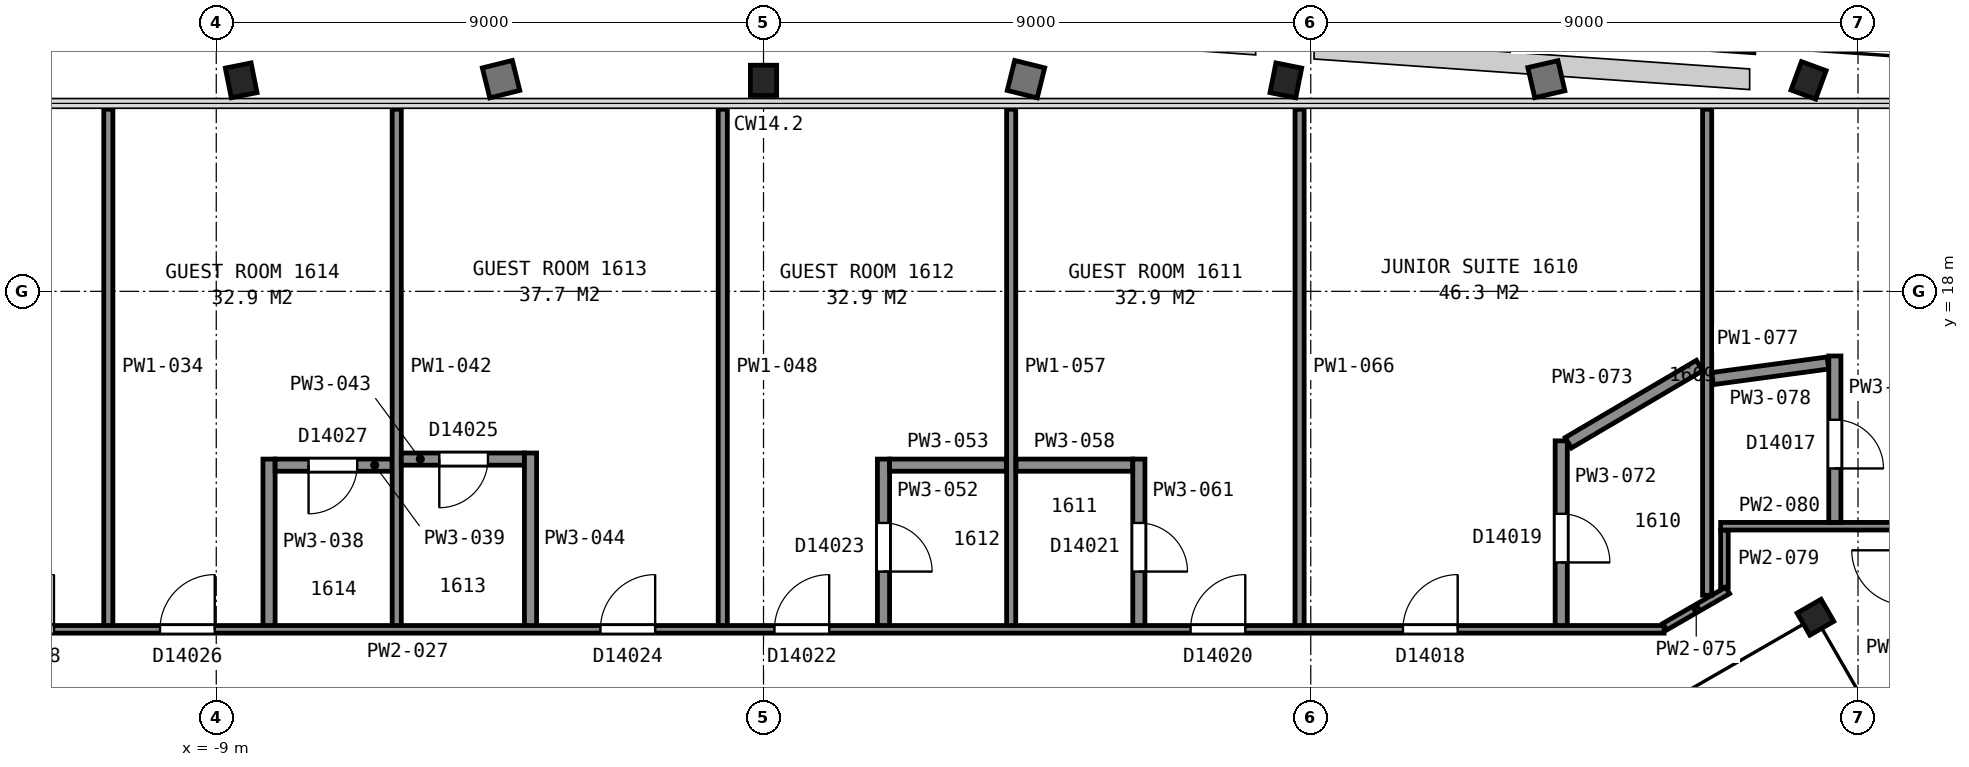
"""IFC4 building model, lengths in metres.
Left out: names, types, materials, properties, quantities, classifications, styles, units other than length and angle.
Written with IfcOpenShell. Run it as: python <this file> out.ifc"""

import sys

from ifc_helpers import new_model, si_unit, direction, frame, frame_2d, origin, origin_2d, place, context, subcontext, project, spatial, rectangle, i_section, extrude, element, fill, save


model = new_model("IFC4")
c1 = context("Model", 3, precision=1e-05, world=origin(), true_north=direction((0.0, 1.0)))
c2 = subcontext(c1, "Body", "Model", "MODEL_VIEW")
j1 = project(units=[si_unit("LENGTHUNIT", "METRE"), si_unit("PLANEANGLEUNIT", "RADIAN")], contexts=[c1])
p1 = place(None, origin())
s1 = spatial("IfcSite", under=j1, at=p1, CompositionType="ELEMENT")
p2 = place(p1, origin())
s2 = spatial("IfcBuilding", under=s1, at=p2, CompositionType="ELEMENT")
p3 = place(p2, frame((0.0, 0.0, 72.8)))
s3 = spatial("IfcBuildingStorey", under=s2, at=p3, CompositionType="ELEMENT", Elevation=72.8)
p4 = place(p3, frame((17.151, 21.372, 0.025), z_axis=(0.030414757347, 0.083024067354, 0.996083303131), x_axis=(0.999533369763, 0.000291044086, -0.030544361571)))
e1 = element("IfcColumn", 1, at=p4, inside=s3, PredefinedType="COLUMN", context=c2, shape_type="SweptSolid", body=[
    extrude(i_section(OverallWidth=0.432, OverallDepth=0.498, WebThickness=0.056, FlangeThickness=0.089, FilletRadius=0.015, at=origin_2d()), origin(), (0.0, 0.0, 1.0), 3.564),
])
p5 = place(p3, frame((8.57, 21.372, 0.025), z_axis=(0.016651310151, 0.083050979027, 0.996406176593), x_axis=(0.999860944096, -0.000477080894, -0.016669279099)))
e2 = element("IfcColumn", 2, at=p5, inside=s3, PredefinedType="COLUMN", context=c2, shape_type="SweptSolid", body=[
    extrude(i_section(OverallWidth=0.432, OverallDepth=0.498, WebThickness=0.056, FlangeThickness=0.089, FilletRadius=0.015, at=origin_2d()), origin(), (0.0, 0.0, 1.0), 3.563),
])
p6 = place(p3, frame((0.0, 21.372, 0.025), z_axis=(0.0, 0.083062495034, 0.996544340167), x_axis=(1.0, 0.0, 0.0)))
e3 = element("IfcColumn", 3, at=p6, inside=s3, PredefinedType="COLUMN", context=c2, shape_type="SweptSolid", body=[
    extrude(i_section(OverallWidth=0.432, OverallDepth=0.498, WebThickness=0.056, FlangeThickness=0.089, FilletRadius=0.015, at=origin_2d()), origin(), (0.0, 0.0, 1.0), 3.562),
])
p7 = place(p3, frame((-8.57, 21.372, 0.025), z_axis=(-0.016651310151, 0.083050979027, 0.996406176593), x_axis=(0.999860944096, 0.000477080894, 0.016669279099)))
e4 = element("IfcColumn", 4, at=p7, inside=s3, PredefinedType="COLUMN", context=c2, shape_type="SweptSolid", body=[
    extrude(i_section(OverallWidth=0.432, OverallDepth=0.498, WebThickness=0.056, FlangeThickness=0.089, FilletRadius=0.015, at=origin_2d()), origin(), (0.0, 0.0, 1.0), 3.563),
])
p8 = place(p3, frame((17.3, 12.64, 0.0), z_axis=(0.0, 0.0, 1.0), x_axis=(0.5, -0.866025403784, 0.0)))
e5 = element("IfcColumn", 5, at=p8, inside=s3, PredefinedType="COLUMN", context=c2, shape_type="SweptSolid", body=[
    extrude(i_section(OverallWidth=0.419, OverallDepth=0.455, WebThickness=0.042, FlangeThickness=0.068, FilletRadius=0.015, at=origin_2d()), origin(), (0.0, 0.0, 1.0), 3.6),
])
p9 = place(p3, frame((-14.811, 12.441, 0.0), z_axis=(0.0, 0.0, 1.0), x_axis=(1.0, 0.0, 0.0)))
e6 = element("IfcWall", 6, at=p9, inside=s3, PredefinedType="PARTITIONING", context=c2, shape_type="SweptSolid", body=[
    extrude(rectangle(XDim=29.621, YDim=0.125, at=frame_2d((14.811, 0.0))), origin(), (0.0, 0.0, 1.0), 2.613),
])
p10 = place(p9, frame((25.326, 0.0, 0.0)))
e7 = element("IfcOpeningElement", 7, at=p10, cuts=e6, PredefinedType="OPENING", context=c2, shape_type="SweptSolid", body=[
    extrude(rectangle(XDim=0.9, YDim=2.1, at=frame_2d((0.45, 1.05))), frame((0.0, 0.073, 0.0), z_axis=(0.0, -1.0, 0.0), x_axis=(1.0, 0.0, 0.0)), (0.0, 0.0, 1.0), 0.145),
])
p11 = place(p9, frame((21.833, 0.0, 0.0)))
e8 = element("IfcOpeningElement", 8, at=p11, cuts=e6, PredefinedType="OPENING", context=c2, shape_type="SweptSolid", body=[
    extrude(rectangle(XDim=0.9, YDim=2.1, at=frame_2d((0.45, 1.05))), frame((0.0, 0.073, 0.0), z_axis=(0.0, -1.0, 0.0), x_axis=(1.0, 0.0, 0.0)), (0.0, 0.0, 1.0), 0.145),
])
p12 = place(p9, frame((14.99, 0.0, 0.0)))
e9 = element("IfcOpeningElement", 9, at=p12, cuts=e6, PredefinedType="OPENING", context=c2, shape_type="SweptSolid", body=[
    extrude(rectangle(XDim=0.9, YDim=2.1, at=frame_2d((0.45, 1.05))), frame((0.0, 0.073, 0.0), z_axis=(0.0, -1.0, 0.0), x_axis=(1.0, 0.0, 0.0)), (0.0, 0.0, 1.0), 0.145),
])
p13 = place(p9, frame((12.128, 0.0, 0.0)))
e10 = element("IfcOpeningElement", 10, at=p13, cuts=e6, PredefinedType="OPENING", context=c2, shape_type="SweptSolid", body=[
    extrude(rectangle(XDim=0.9, YDim=2.1, at=frame_2d((0.45, 1.05))), frame((0.0, 0.073, 0.0), z_axis=(0.0, -1.0, 0.0), x_axis=(1.0, 0.0, 0.0)), (0.0, 0.0, 1.0), 0.145),
])
p14 = place(p9, frame((4.885, 0.0, 0.0)))
e11 = element("IfcOpeningElement", 11, at=p14, cuts=e6, PredefinedType="OPENING", context=c2, shape_type="SweptSolid", body=[
    extrude(rectangle(XDim=0.9, YDim=2.1, at=frame_2d((0.45, 1.05))), frame((0.0, 0.073, 0.0), z_axis=(0.0, -1.0, 0.0), x_axis=(1.0, 0.0, 0.0)), (0.0, 0.0, 1.0), 0.145),
])
p15 = place(p9, frame((2.241, 0.0, 0.0)))
e12 = element("IfcOpeningElement", 12, at=p15, cuts=e6, PredefinedType="OPENING", context=c2, shape_type="SweptSolid", body=[
    extrude(rectangle(XDim=0.9, YDim=2.1, at=frame_2d((0.45, 1.05))), frame((0.0, 0.073, 0.0), z_axis=(0.0, -1.0, 0.0), x_axis=(1.0, 0.0, 0.0)), (0.0, 0.0, 1.0), 0.145),
])
p16 = place(p3, frame((-10.775, 12.503, 0.0), z_axis=(0.0, 0.0, 1.0), x_axis=(0.0, 1.0, 0.0)))
e13 = element("IfcWall", 13, at=p16, inside=s3, PredefinedType="PARTITIONING", context=c2, shape_type="SweptSolid", body=[
    extrude(rectangle(XDim=8.492, YDim=0.15, at=frame_2d((4.246, 0.0))), origin(), (0.0, 0.0, 1.0), 2.613),
])
p17 = place(p3, frame((-8.132, 12.503, 0.0), z_axis=(0.0, 0.0, 1.0), x_axis=(0.0, 1.0, 0.0)))
e14 = element("IfcWall", 14, at=p17, inside=s3, PredefinedType="PARTITIONING", context=c2, shape_type="SweptSolid", body=[
    extrude(rectangle(XDim=2.738, YDim=0.2, at=frame_2d((1.369, 0.0))), origin(), (0.0, 0.0, 1.0), 2.613),
])
p18 = place(p3, frame((-6.107, 15.141, 0.0), z_axis=(0.0, 0.0, 1.0), x_axis=(-1.0, 0.0, 0.0)))
e15 = element("IfcWall", 15, at=p18, inside=s3, PredefinedType="PARTITIONING", context=c2, shape_type="SweptSolid", body=[
    extrude(rectangle(XDim=1.925, YDim=0.2, at=frame_2d((0.962, 0.0))), origin(), (0.0, 0.0, 1.0), 2.613),
])
p19 = place(p18, frame((0.575, 0.0, 0.0)))
e16 = element("IfcOpeningElement", 16, at=p19, cuts=e15, PredefinedType="OPENING", context=c2, shape_type="SweptSolid", body=[
    extrude(rectangle(XDim=0.8, YDim=2.1, at=frame_2d((0.4, 1.05))), frame((0.0, 0.11, 0.0), z_axis=(0.0, -1.0, 0.0), x_axis=(1.0, 0.0, 0.0)), (0.0, 0.0, 1.0), 0.22),
])
p20 = place(p3, frame((-6.032, 12.503, 0.0), z_axis=(0.0, 0.0, 1.0), x_axis=(0.0, 1.0, 0.0)))
e17 = element("IfcWall", 17, at=p20, inside=s3, PredefinedType="PARTITIONING", context=c2, shape_type="SweptSolid", body=[
    extrude(rectangle(XDim=8.492, YDim=0.15, at=frame_2d((4.246, 0.0))), origin(), (0.0, 0.0, 1.0), 2.613),
])
p21 = place(p3, frame((-3.932, 15.241, 0.0), z_axis=(0.0, 0.0, 1.0), x_axis=(-1.0, 0.0, 0.0)))
e18 = element("IfcWall", 18, at=p21, inside=s3, PredefinedType="PARTITIONING", context=c2, shape_type="SweptSolid", body=[
    extrude(rectangle(XDim=2.025, YDim=0.2, at=frame_2d((1.013, 0.0))), origin(), (0.0, 0.0, 1.0), 2.613),
])
p22 = place(p21, frame((0.6, 0.0, 0.0)))
e19 = element("IfcOpeningElement", 19, at=p22, cuts=e18, PredefinedType="OPENING", context=c2, shape_type="SweptSolid", body=[
    extrude(rectangle(XDim=0.8, YDim=2.1, at=frame_2d((0.4, 1.05))), frame((0.0, 0.11, 0.0), z_axis=(0.0, -1.0, 0.0), x_axis=(1.0, 0.0, 0.0)), (0.0, 0.0, 1.0), 0.22),
])
p23 = place(p3, frame((-3.832, 12.503, 0.0), z_axis=(0.0, 0.0, 1.0), x_axis=(0.0, 1.0, 0.0)))
e20 = element("IfcWall", 20, at=p23, inside=s3, PredefinedType="PARTITIONING", context=c2, shape_type="SweptSolid", body=[
    extrude(rectangle(XDim=2.838, YDim=0.2, at=frame_2d((1.419, 0.0))), origin(), (0.0, 0.0, 1.0), 2.613),
])
p24 = place(p3, frame((-0.67, 12.503, 0.0), z_axis=(0.0, 0.0, 1.0), x_axis=(0.0, 1.0, 0.0)))
e21 = element("IfcWall", 21, at=p24, inside=s3, PredefinedType="PARTITIONING", context=c2, shape_type="SweptSolid", body=[
    extrude(rectangle(XDim=8.492, YDim=0.15, at=frame_2d((4.246, 0.0))), origin(), (0.0, 0.0, 1.0), 2.613),
])
p25 = place(p3, frame((1.973, 15.241, 0.0), z_axis=(0.0, 0.0, 1.0), x_axis=(0.0, -1.0, 0.0)))
e22 = element("IfcWall", 22, at=p25, inside=s3, PredefinedType="PARTITIONING", context=c2, shape_type="SweptSolid", body=[
    extrude(rectangle(XDim=2.738, YDim=0.2, at=frame_2d((1.369, 0.0))), origin(), (0.0, 0.0, 1.0), 2.613),
])
p26 = place(p25, frame((1.05, 0.0, 0.0)))
e23 = element("IfcOpeningElement", 23, at=p26, cuts=e22, PredefinedType="OPENING", context=c2, shape_type="SweptSolid", body=[
    extrude(rectangle(XDim=0.8, YDim=2.1, at=frame_2d((0.4, 1.05))), frame((0.0, 0.11, 0.0), z_axis=(0.0, -1.0, 0.0), x_axis=(1.0, 0.0, 0.0)), (0.0, 0.0, 1.0), 0.22),
])
p27 = place(p3, frame((2.073, 15.141, 0.0), z_axis=(0.0, 0.0, 1.0), x_axis=(1.0, 0.0, 0.0)))
e24 = element("IfcWall", 24, at=p27, inside=s3, PredefinedType="PARTITIONING", context=c2, shape_type="SweptSolid", body=[
    extrude(rectangle(XDim=1.92, YDim=0.2, at=frame_2d((0.96, 0.0))), origin(), (0.0, 0.0, 1.0), 2.613),
])
p28 = place(p3, frame((4.073, 12.503, 0.0), z_axis=(0.0, 0.0, 1.0), x_axis=(0.0, 1.0, 0.0)))
e25 = element("IfcWall", 25, at=p28, inside=s3, PredefinedType="PARTITIONING", context=c2, shape_type="SweptSolid", body=[
    extrude(rectangle(XDim=8.492, YDim=0.15, at=frame_2d((4.246, 0.0))), origin(), (0.0, 0.0, 1.0), 2.613),
])
p29 = place(p3, frame((4.153, 15.141, 0.0), z_axis=(0.0, 0.0, 1.0), x_axis=(1.0, 0.0, 0.0)))
e26 = element("IfcWall", 26, at=p29, inside=s3, PredefinedType="PARTITIONING", context=c2, shape_type="SweptSolid", body=[
    extrude(rectangle(XDim=1.92, YDim=0.2, at=frame_2d((0.96, 0.0))), origin(), (0.0, 0.0, 1.0), 2.613),
])
p30 = place(p3, frame((6.173, 12.503, 0.0), z_axis=(0.0, 0.0, 1.0), x_axis=(0.0, 1.0, 0.0)))
e27 = element("IfcWall", 27, at=p30, inside=s3, PredefinedType="PARTITIONING", context=c2, shape_type="SweptSolid", body=[
    extrude(rectangle(XDim=2.738, YDim=0.2, at=frame_2d((1.369, 0.0))), origin(), (0.0, 0.0, 1.0), 2.613),
])
p31 = place(p30, frame((0.887, 0.0, 0.0)))
e28 = element("IfcOpeningElement", 28, at=p31, cuts=e27, PredefinedType="OPENING", context=c2, shape_type="SweptSolid", body=[
    extrude(rectangle(XDim=0.8, YDim=2.1, at=frame_2d((0.4, 1.05))), frame((0.0, 0.11, 0.0), z_axis=(0.0, -1.0, 0.0), x_axis=(1.0, 0.0, 0.0)), (0.0, 0.0, 1.0), 0.22),
])
p32 = place(p3, frame((8.816, 12.503, 0.0), z_axis=(0.0, 0.0, 1.0), x_axis=(0.0, 1.0, 0.0)))
e29 = element("IfcWall", 29, at=p32, inside=s3, PredefinedType="PARTITIONING", context=c2, shape_type="SweptSolid", body=[
    extrude(rectangle(XDim=8.492, YDim=0.15, at=frame_2d((4.246, 0.0))), origin(), (0.0, 0.0, 1.0), 2.613),
])
p33 = place(p3, frame((13.119, 15.541, 0.0), z_axis=(0.0, 0.0, 1.0), x_axis=(0.0, -1.0, 0.0)))
e30 = element("IfcWall", 30, at=p33, inside=s3, PredefinedType="PARTITIONING", context=c2, shape_type="SweptSolid", body=[
    extrude(rectangle(XDim=3.038, YDim=0.2, at=frame_2d((1.519, 0.0))), origin(), (0.0, 0.0, 1.0), 2.613),
])
p34 = place(p33, frame((1.2, 0.0, 0.0)))
e31 = element("IfcOpeningElement", 31, at=p34, cuts=e30, PredefinedType="OPENING", context=c2, shape_type="SweptSolid", body=[
    extrude(rectangle(XDim=0.8, YDim=2.1, at=frame_2d((0.4, 1.05))), frame((0.0, 0.11, 0.0), z_axis=(0.0, -1.0, 0.0), x_axis=(1.0, 0.0, 0.0)), (0.0, 0.0, 1.0), 0.22),
])
p35 = place(p3, frame((13.235, 15.51, 0.0), z_axis=(0.0, 0.0, 1.0), x_axis=(0.861909146735, 0.507062740471, 0.0)))
e32 = element("IfcWall", 32, at=p35, inside=s3, PredefinedType="PARTITIONING", context=c2, shape_type="SweptSolid", body=[
    extrude(rectangle(XDim=2.504, YDim=0.2, at=frame_2d((1.252, 0.0))), origin(), (0.0, 0.0, 1.0), 2.613),
])
p36 = place(p3, frame((14.822, 12.483, 0.0), z_axis=(0.0, 0.0, 1.0), x_axis=(0.866035997947, 0.499981649923, 0.0)))
e33 = element("IfcWall", 33, at=p36, inside=s3, PredefinedType="PARTITIONING", context=c2, shape_type="SweptSolid", body=[
    extrude(rectangle(XDim=1.196, YDim=0.125, at=frame_2d((0.598, 0.0))), origin(), (0.0, 0.0, 1.0), 2.613),
])
p37 = place(p3, frame((15.519, 13.001, 0.0), z_axis=(0.0, 0.0, 1.0), x_axis=(0.0, 1.0, 0.0)))
e34 = element("IfcWall", 34, at=p37, inside=s3, PredefinedType="PARTITIONING", context=c2, shape_type="SweptSolid", body=[
    extrude(rectangle(XDim=7.994, YDim=0.15, at=frame_2d((3.997, 0.0))), origin(), (0.0, 0.0, 1.0), 2.613),
])
p38 = place(p3, frame((15.607, 16.565, 0.0), z_axis=(0.0, 0.0, 1.0), x_axis=(0.990982367401, 0.133992341199, 0.0)))
e35 = element("IfcWall", 35, at=p38, inside=s3, PredefinedType="PARTITIONING", context=c2, shape_type="SweptSolid", body=[
    extrude(rectangle(XDim=1.915, YDim=0.2, at=frame_2d((0.958, 0.0))), origin(), (0.0, 0.0, 1.0), 2.613),
])
p39 = place(p3, frame((15.803, 13.135, 0.0), z_axis=(0.0, 0.0, 1.0), x_axis=(0.0, 1.0, 0.0)))
e36 = element("IfcWall", 36, at=p39, inside=s3, PredefinedType="PARTITIONING", context=c2, shape_type="SweptSolid", body=[
    extrude(rectangle(XDim=0.937, YDim=0.125, at=frame_2d((0.469, 0.0))), origin(), (0.0, 0.0, 1.0), 2.613),
])
p40 = place(p3, frame((15.74, 14.137, 0.0), z_axis=(0.0, 0.0, 1.0), x_axis=(1.0, 0.0, 0.0)))
e37 = element("IfcWall", 37, at=p40, inside=s3, PredefinedType="PARTITIONING", context=c2, shape_type="SweptSolid", body=[
    extrude(rectangle(XDim=3.119, YDim=0.125, at=frame_2d((1.56, 0.0))), origin(), (0.0, 0.0, 1.0), 2.613),
])
p41 = place(p3, frame((17.619, 14.199, 0.0), z_axis=(0.0, 0.0, 1.0), x_axis=(0.0, 1.0, 0.0)))
e38 = element("IfcWall", 38, at=p41, inside=s3, PredefinedType="PARTITIONING", context=c2, shape_type="SweptSolid", body=[
    extrude(rectangle(XDim=2.738, YDim=0.2, at=frame_2d((1.369, 0.0))), origin(), (0.0, 0.0, 1.0), 2.613),
])
p42 = place(p41, frame((0.887, 0.0, 0.0)))
e39 = element("IfcOpeningElement", 39, at=p42, cuts=e38, PredefinedType="OPENING", context=c2, shape_type="SweptSolid", body=[
    extrude(rectangle(XDim=0.8, YDim=2.1, at=frame_2d((0.4, 1.05))), frame((0.0, 0.11, 0.0), z_axis=(0.0, -1.0, 0.0), x_axis=(1.0, 0.0, 0.0)), (0.0, 0.0, 1.0), 0.22),
])
p43 = place(p10, origin())
e40 = element("IfcDoor", 40, at=p43, inside=s3, OperationType="SINGLE_SWING_RIGHT", PredefinedType="DOOR", context=c2, shape_type="SweptSolid", body=[
    extrude(rectangle(XDim=0.9, YDim=2.1, at=frame_2d((0.45, 1.05))), frame((0.0, 0.025, 0.0), z_axis=(0.0, -1.0, 0.0), x_axis=(1.0, 0.0, 0.0)), (0.0, 0.0, 1.0), 0.05),
])
fill(e7, e40)
p44 = place(p11, origin())
e41 = element("IfcDoor", 41, at=p44, inside=s3, OperationType="SINGLE_SWING_RIGHT", PredefinedType="DOOR", context=c2, shape_type="SweptSolid", body=[
    extrude(rectangle(XDim=0.9, YDim=2.1, at=frame_2d((0.45, 1.05))), frame((0.0, 0.025, 0.0), z_axis=(0.0, -1.0, 0.0), x_axis=(1.0, 0.0, 0.0)), (0.0, 0.0, 1.0), 0.05),
])
fill(e8, e41)
p45 = place(p12, origin())
e42 = element("IfcDoor", 42, at=p45, inside=s3, OperationType="SINGLE_SWING_RIGHT", PredefinedType="DOOR", context=c2, shape_type="SweptSolid", body=[
    extrude(rectangle(XDim=0.9, YDim=2.1, at=frame_2d((0.45, 1.05))), frame((0.0, 0.025, 0.0), z_axis=(0.0, -1.0, 0.0), x_axis=(1.0, 0.0, 0.0)), (0.0, 0.0, 1.0), 0.05),
])
fill(e9, e42)
p46 = place(p13, origin())
e43 = element("IfcDoor", 43, at=p46, inside=s3, OperationType="SINGLE_SWING_RIGHT", PredefinedType="DOOR", context=c2, shape_type="SweptSolid", body=[
    extrude(rectangle(XDim=0.9, YDim=2.1, at=frame_2d((0.45, 1.05))), frame((0.0, 0.025, 0.0), z_axis=(0.0, -1.0, 0.0), x_axis=(1.0, 0.0, 0.0)), (0.0, 0.0, 1.0), 0.05),
])
fill(e10, e43)
p47 = place(p14, origin())
e44 = element("IfcDoor", 44, at=p47, inside=s3, OperationType="SINGLE_SWING_RIGHT", PredefinedType="DOOR", context=c2, shape_type="SweptSolid", body=[
    extrude(rectangle(XDim=0.9, YDim=2.1, at=frame_2d((0.45, 1.05))), frame((0.0, 0.025, 0.0), z_axis=(0.0, -1.0, 0.0), x_axis=(1.0, 0.0, 0.0)), (0.0, 0.0, 1.0), 0.05),
])
fill(e11, e44)
p48 = place(p15, origin())
e45 = element("IfcDoor", 45, at=p48, inside=s3, OperationType="SINGLE_SWING_RIGHT", PredefinedType="DOOR", context=c2, shape_type="SweptSolid", body=[
    extrude(rectangle(XDim=0.9, YDim=2.1, at=frame_2d((0.45, 1.05))), frame((0.0, 0.025, 0.0), z_axis=(0.0, -1.0, 0.0), x_axis=(1.0, 0.0, 0.0)), (0.0, 0.0, 1.0), 0.05),
])
fill(e12, e45)
p49 = place(p19, origin())
e46 = element("IfcDoor", 46, at=p49, inside=s3, OperationType="SINGLE_SWING_RIGHT", PredefinedType="DOOR", context=c2, shape_type="SweptSolid", body=[
    extrude(rectangle(XDim=0.8, YDim=2.1, at=frame_2d((0.4, 1.05))), frame((0.0, 0.025, 0.0), z_axis=(0.0, -1.0, 0.0), x_axis=(1.0, 0.0, 0.0)), (0.0, 0.0, 1.0), 0.05),
])
fill(e16, e46)
p50 = place(p22, origin())
e47 = element("IfcDoor", 47, at=p50, inside=s3, OperationType="SINGLE_SWING_RIGHT", PredefinedType="DOOR", context=c2, shape_type="SweptSolid", body=[
    extrude(rectangle(XDim=0.8, YDim=2.1, at=frame_2d((0.4, 1.05))), frame((0.0, 0.025, 0.0), z_axis=(0.0, -1.0, 0.0), x_axis=(1.0, 0.0, 0.0)), (0.0, 0.0, 1.0), 0.05),
])
fill(e19, e47)
p51 = place(p26, origin())
e48 = element("IfcDoor", 48, at=p51, inside=s3, OperationType="SINGLE_SWING_RIGHT", PredefinedType="DOOR", context=c2, shape_type="SweptSolid", body=[
    extrude(rectangle(XDim=0.8, YDim=2.1, at=frame_2d((0.4, 1.05))), frame((0.0, 0.025, 0.0), z_axis=(0.0, -1.0, 0.0), x_axis=(1.0, 0.0, 0.0)), (0.0, 0.0, 1.0), 0.05),
])
fill(e23, e48)
p52 = place(p31, origin())
e49 = element("IfcDoor", 49, at=p52, inside=s3, OperationType="SINGLE_SWING_LEFT", PredefinedType="DOOR", context=c2, shape_type="SweptSolid", body=[
    extrude(rectangle(XDim=0.8, YDim=2.1, at=frame_2d((0.4, 1.05))), frame((0.0, 0.025, 0.0), z_axis=(0.0, -1.0, 0.0), x_axis=(1.0, 0.0, 0.0)), (0.0, 0.0, 1.0), 0.05),
])
fill(e28, e49)
p53 = place(p34, origin())
e50 = element("IfcDoor", 50, at=p53, inside=s3, OperationType="SINGLE_SWING_RIGHT", PredefinedType="DOOR", context=c2, shape_type="SweptSolid", body=[
    extrude(rectangle(XDim=0.8, YDim=2.1, at=frame_2d((0.4, 1.05))), frame((0.0, 0.025, 0.0), z_axis=(0.0, -1.0, 0.0), x_axis=(1.0, 0.0, 0.0)), (0.0, 0.0, 1.0), 0.05),
])
fill(e31, e50)
p54 = place(p42, origin())
e51 = element("IfcDoor", 51, at=p54, inside=s3, OperationType="SINGLE_SWING_LEFT", PredefinedType="DOOR", context=c2, shape_type="SweptSolid", body=[
    extrude(rectangle(XDim=0.8, YDim=2.1, at=frame_2d((0.4, 1.05))), frame((0.0, 0.025, 0.0), z_axis=(0.0, -1.0, 0.0), x_axis=(1.0, 0.0, 0.0)), (0.0, 0.0, 1.0), 0.05),
])
fill(e39, e51)
save(model, sys.argv[1])
